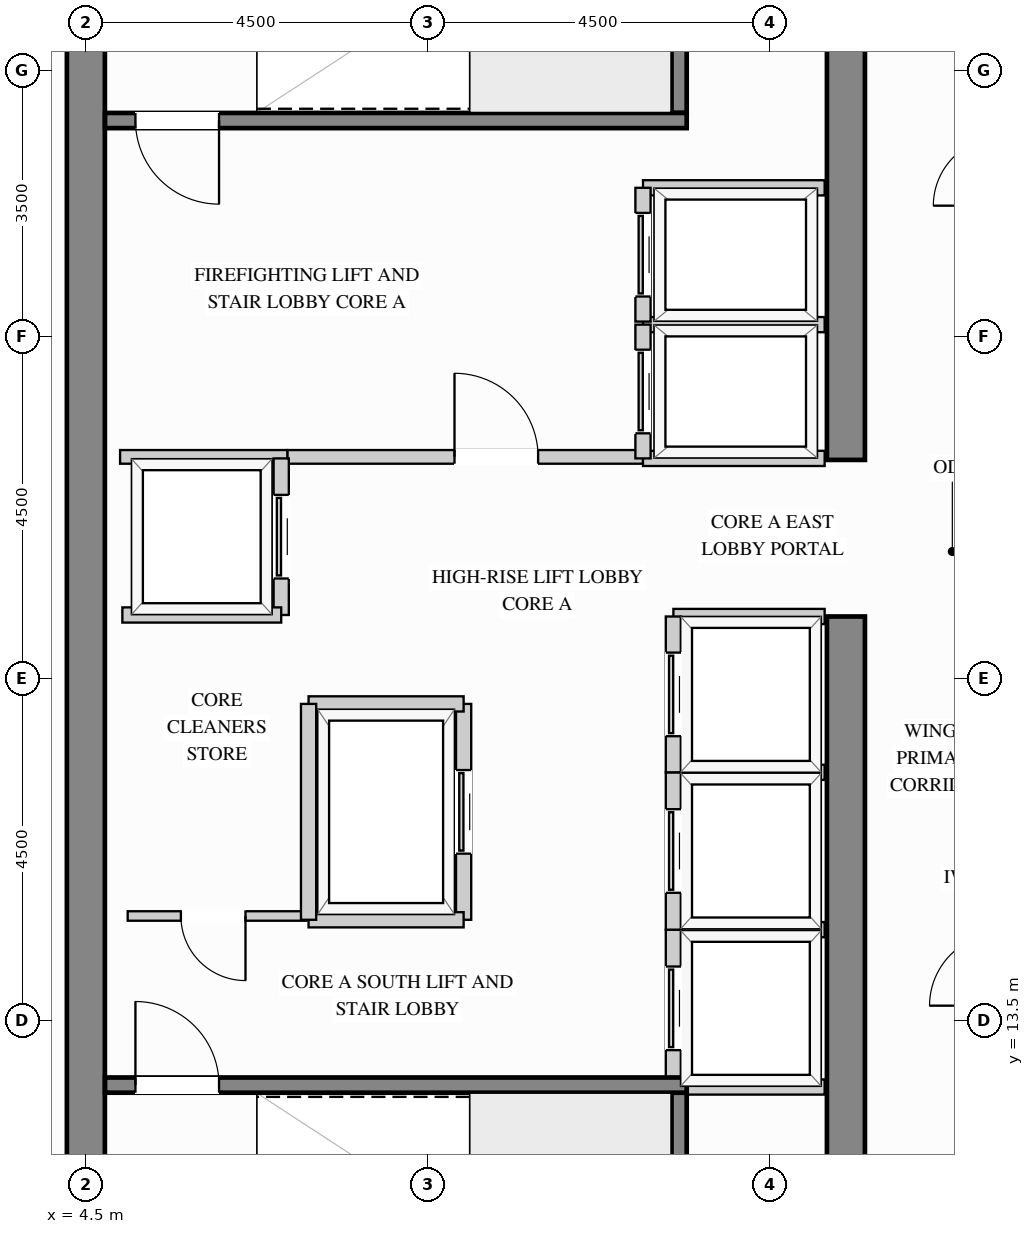
"""IFC4 building model, lengths in metres.
Left out: names, types, materials, properties, quantities, classifications, styles, units other than length and angle.
Written with IfcOpenShell. Run it as: python <this file> out.ifc"""

import sys

from ifc_helpers import new_model, si_unit, direction, frame, frame_2d, origin, place, context, subcontext, project, spatial, rectangle, extrude, source, transform, mapped, element, fill, save


model = new_model("IFC4")
c1 = context("Model", 3, precision=1e-05, world=origin(), true_north=direction((0.0, 1.0)))
c2 = subcontext(c1, "Body", "Model", "MODEL_VIEW")
j1 = project(units=[si_unit("LENGTHUNIT", "METRE"), si_unit("PLANEANGLEUNIT", "RADIAN")], contexts=[c1])
p1 = place(None, origin())
s1 = spatial("IfcSite", under=j1, at=p1, CompositionType="ELEMENT")
p2 = place(p1, origin())
s2 = spatial("IfcBuilding", under=s1, at=p2, CompositionType="ELEMENT")
p3 = place(p2, frame((0.0, 0.0, 212.4)))
s3 = spatial("IfcBuildingStorey", under=s2, at=p3, CompositionType="ELEMENT", Elevation=212.4)
m1 = source(origin(), c2, "Body", "SweptSolid", [
    extrude(rectangle(XDim=10.07, YDim=0.5, at=frame_2d((5.035, 0.0))), origin(), (0.0, 0.0, 1.0), 3.4),
])
p4 = place(p3, frame((14.5, 8.75, 0.0), z_axis=(0.0, 0.0, 1.0), x_axis=(0.0, 1.0, 0.0)))
e1 = element("IfcWall", 1, at=p4, inside=s3, PredefinedType="SHEAR", context=c2, shape_type="MappedRepresentation", body=[
    mapped(m1, transform((0.0, 0.0, 0.0), x_axis=(1.0, 0.0, 0.0), y_axis=(0.0, 1.0, 0.0), z_axis=(0.0, 0.0, 1.0))),
])
m2 = source(origin(), c2, "Body", "SweptSolid", [
    extrude(rectangle(XDim=8.37, YDim=0.5, at=frame_2d((4.185, 0.0))), origin(), (0.0, 0.0, 1.0), 3.4),
])
p5 = place(p3, frame((14.5, 20.88, 0.0), z_axis=(0.0, 0.0, 1.0), x_axis=(0.0, 1.0, 0.0)))
e2 = element("IfcWall", 2, at=p5, inside=s3, PredefinedType="SHEAR", context=c2, shape_type="MappedRepresentation", body=[
    mapped(m2, transform((0.0, 0.0, 0.0), x_axis=(1.0, 0.0, 0.0), y_axis=(0.0, 1.0, 0.0), z_axis=(0.0, 0.0, 1.0))),
])
m3 = source(origin(), c2, "Body", "SweptSolid", [
    extrude(rectangle(XDim=20.5, YDim=0.5, at=frame_2d((10.25, 0.0))), origin(), (0.0, 0.0, 1.0), 3.4),
])
p6 = place(p3, frame((4.5, 8.75, 0.0), z_axis=(0.0, 0.0, 1.0), x_axis=(0.0, 1.0, 0.0)))
e3 = element("IfcWall", 3, at=p6, inside=s3, PredefinedType="SHEAR", context=c2, shape_type="MappedRepresentation", body=[
    mapped(m3, transform((0.0, 0.0, 0.0), x_axis=(1.0, 0.0, 0.0), y_axis=(0.0, 1.0, 0.0), z_axis=(0.0, 0.0, 1.0))),
])
p7 = place(p3, frame((7.15, 20.92, 0.0), z_axis=(0.0, 0.0, 1.0), x_axis=(1.0, 0.0, 0.0)))
e4 = element("IfcWall", 4, at=p7, inside=s3, PredefinedType="PARTITIONING", context=c2, shape_type="SweptSolid", body=[
    extrude(rectangle(XDim=4.68, YDim=0.18, at=frame_2d((2.34, 0.0))), origin(), (0.0, 0.0, 1.0), 3.385),
])
p8 = place(p7, frame((2.2, 0.0, 0.0)))
e5 = element("IfcOpeningElement", 5, at=p8, cuts=e4, PredefinedType="OPENING", context=c2, shape_type="SweptSolid", body=[
    extrude(rectangle(XDim=1.1, YDim=2.15, at=frame_2d((0.55, 1.075))), frame((0.0, 0.1, 0.0), z_axis=(0.0, -1.0, 0.0), x_axis=(1.0, 0.0, 0.0)), (0.0, 0.0, 1.0), 0.2),
])
m4 = source(origin(), c2, "Body", "SweptSolid", [
    extrude(rectangle(XDim=2.2, YDim=0.18, at=frame_2d((1.1, 0.0))), origin(), (0.0, 0.0, 1.0), 3.385),
])
p9 = place(p3, frame((4.95, 20.92, 0.0), z_axis=(0.0, 0.0, 1.0), x_axis=(1.0, 0.0, 0.0)))
e6 = element("IfcWall", 6, at=p9, inside=s3, PredefinedType="PARTITIONING", context=c2, shape_type="MappedRepresentation", body=[
    mapped(m4, transform((0.0, 0.0, 0.0), x_axis=(1.0, 0.0, 0.0), y_axis=(0.0, 1.0, 0.0), z_axis=(0.0, 0.0, 1.0))),
])
p10 = place(p3, frame((5.05, 14.88, 0.0), z_axis=(0.0, 0.0, 1.0), x_axis=(1.0, 0.0, 0.0)))
e7 = element("IfcWall", 7, at=p10, inside=s3, PredefinedType="PARTITIONING", context=c2, shape_type="SweptSolid", body=[
    extrude(rectangle(XDim=2.35, YDim=0.125, at=frame_2d((1.175, 0.0))), origin(), (0.0, 0.0, 1.0), 3.385),
])
p11 = place(p10, frame((0.7, 0.0, 0.0)))
e8 = element("IfcOpeningElement", 8, at=p11, cuts=e7, PredefinedType="OPENING", context=c2, shape_type="SweptSolid", body=[
    extrude(rectangle(XDim=0.85, YDim=2.1, at=frame_2d((0.425, 1.05))), frame((0.0, 0.073, 0.0), z_axis=(0.0, -1.0, 0.0), x_axis=(1.0, 0.0, 0.0)), (0.0, 0.0, 1.0), 0.145),
])
m5 = source(origin(), c2, "Body", "SweptSolid", [
    extrude(rectangle(XDim=2.39, YDim=0.2, at=frame_2d((1.195, 0.0))), origin(), (0.0, 0.0, 1.0), 3.385),
])
for number, where, z_axis, x_axis in (
    (9, (11.83, 22.66, 0.0), (0.0, 0.0, 1.0), (1.0, 0.0, 0.0)),
    (10, (11.83, 20.9, 0.0), (0.0, 0.0, 1.0), (1.0, 0.0, 0.0)),
):
    element("IfcWall", number, at=place(p3, frame(where, z_axis=z_axis, x_axis=x_axis)), inside=s3, PredefinedType="PARTITIONING", context=c2, shape_type="MappedRepresentation", body=[
        mapped(m5, transform((0.0, 0.0, 0.0), x_axis=(1.0, 0.0, 0.0), y_axis=(0.0, 1.0, 0.0), z_axis=(0.0, 0.0, 1.0))),
    ])
p12 = place(p3, frame((11.83, 20.9, 0.0), z_axis=(0.0, 0.0, 1.0), x_axis=(0.0, 1.0, 0.0)))
e11 = element("IfcWall", 11, at=p12, inside=s3, PredefinedType="PARTITIONING", context=c2, shape_type="SweptSolid", body=[
    extrude(rectangle(XDim=1.76, YDim=0.2, at=frame_2d((0.88, 0.0))), origin(), (0.0, 0.0, 1.0), 3.385),
])
p13 = place(p12, frame((0.33, 0.0, 0.0)))
e12 = element("IfcOpeningElement", 12, at=p13, cuts=e11, PredefinedType="OPENING", context=c2, shape_type="SweptSolid", body=[
    extrude(rectangle(XDim=1.1, YDim=2.2, at=frame_2d((0.55, 1.1))), frame((0.0, 0.11, 0.0), z_axis=(0.0, -1.0, 0.0), x_axis=(1.0, 0.0, 0.0)), (0.0, 0.0, 1.0), 0.22),
])
p14 = place(p3, frame((11.83, 24.46, 0.0), z_axis=(0.0, 0.0, 1.0), x_axis=(1.0, 0.0, 0.0)))
e13 = element("IfcWall", 13, at=p14, inside=s3, PredefinedType="PARTITIONING", context=c2, shape_type="MappedRepresentation", body=[
    mapped(m5, transform((0.0, 0.0, 0.0), x_axis=(1.0, 0.0, 0.0), y_axis=(0.0, 1.0, 0.0), z_axis=(0.0, 0.0, 1.0))),
])
p15 = place(p3, frame((11.83, 22.7, 0.0), z_axis=(0.0, 0.0, 1.0), x_axis=(0.0, 1.0, 0.0)))
e14 = element("IfcWall", 14, at=p15, inside=s3, PredefinedType="PARTITIONING", context=c2, shape_type="SweptSolid", body=[
    extrude(rectangle(XDim=1.76, YDim=0.2, at=frame_2d((0.88, 0.0))), origin(), (0.0, 0.0, 1.0), 3.385),
])
p16 = place(p15, frame((0.33, 0.0, 0.0)))
e15 = element("IfcOpeningElement", 15, at=p16, cuts=e14, PredefinedType="OPENING", context=c2, shape_type="SweptSolid", body=[
    extrude(rectangle(XDim=1.1, YDim=2.2, at=frame_2d((0.55, 1.1))), frame((0.0, 0.11, 0.0), z_axis=(0.0, -1.0, 0.0), x_axis=(1.0, 0.0, 0.0)), (0.0, 0.0, 1.0), 0.22),
])
m6 = source(origin(), c2, "Body", "SweptSolid", [
    extrude(rectangle(XDim=1.99, YDim=0.2, at=frame_2d((0.995, 0.0))), origin(), (0.0, 0.0, 1.0), 3.385),
])
for number, where, z_axis, x_axis in (
    (16, (12.23, 14.7, 0.0), (0.0, 0.0, 1.0), (1.0, 0.0, 0.0)),
    (17, (12.23, 12.63, 0.0), (0.0, 0.0, 1.0), (1.0, 0.0, 0.0)),
):
    element("IfcWall", number, at=place(p3, frame(where, z_axis=z_axis, x_axis=x_axis)), inside=s3, PredefinedType="PARTITIONING", context=c2, shape_type="MappedRepresentation", body=[
        mapped(m6, transform((0.0, 0.0, 0.0), x_axis=(1.0, 0.0, 0.0), y_axis=(0.0, 1.0, 0.0), z_axis=(0.0, 0.0, 1.0))),
    ])
p17 = place(p3, frame((12.23, 12.63, 0.0), z_axis=(0.0, 0.0, 1.0), x_axis=(0.0, 1.0, 0.0)))
e18 = element("IfcWall", 18, at=p17, inside=s3, PredefinedType="PARTITIONING", context=c2, shape_type="SweptSolid", body=[
    extrude(rectangle(XDim=2.07, YDim=0.2, at=frame_2d((1.035, 0.0))), origin(), (0.0, 0.0, 1.0), 3.385),
])
p18 = place(p17, frame((0.485, 0.0, 0.0)))
e19 = element("IfcOpeningElement", 19, at=p18, cuts=e18, PredefinedType="OPENING", context=c2, shape_type="SweptSolid", body=[
    extrude(rectangle(XDim=1.1, YDim=2.2, at=frame_2d((0.55, 1.1))), frame((0.0, 0.11, 0.0), z_axis=(0.0, -1.0, 0.0), x_axis=(1.0, 0.0, 0.0)), (0.0, 0.0, 1.0), 0.22),
])
p19 = place(p3, frame((12.23, 16.77, 0.0), z_axis=(0.0, 0.0, 1.0), x_axis=(1.0, 0.0, 0.0)))
e20 = element("IfcWall", 20, at=p19, inside=s3, PredefinedType="PARTITIONING", context=c2, shape_type="MappedRepresentation", body=[
    mapped(m6, transform((0.0, 0.0, 0.0), x_axis=(1.0, 0.0, 0.0), y_axis=(0.0, 1.0, 0.0), z_axis=(0.0, 0.0, 1.0))),
])
p20 = place(p3, frame((12.23, 14.7, 0.0), z_axis=(0.0, 0.0, 1.0), x_axis=(0.0, 1.0, 0.0)))
e21 = element("IfcWall", 21, at=p20, inside=s3, PredefinedType="PARTITIONING", context=c2, shape_type="SweptSolid", body=[
    extrude(rectangle(XDim=2.07, YDim=0.2, at=frame_2d((1.035, 0.0))), origin(), (0.0, 0.0, 1.0), 3.385),
])
p21 = place(p20, frame((0.485, 0.0, 0.0)))
e22 = element("IfcOpeningElement", 22, at=p21, cuts=e21, PredefinedType="OPENING", context=c2, shape_type="SweptSolid", body=[
    extrude(rectangle(XDim=1.1, YDim=2.2, at=frame_2d((0.55, 1.1))), frame((0.0, 0.11, 0.0), z_axis=(0.0, -1.0, 0.0), x_axis=(1.0, 0.0, 0.0)), (0.0, 0.0, 1.0), 0.22),
])
p22 = place(p3, frame((12.23, 18.82, 0.0), z_axis=(0.0, 0.0, 1.0), x_axis=(1.0, 0.0, 0.0)))
e23 = element("IfcWall", 23, at=p22, inside=s3, PredefinedType="PARTITIONING", context=c2, shape_type="MappedRepresentation", body=[
    mapped(m6, transform((0.0, 0.0, 0.0), x_axis=(1.0, 0.0, 0.0), y_axis=(0.0, 1.0, 0.0), z_axis=(0.0, 0.0, 1.0))),
])
p23 = place(p3, frame((12.23, 16.77, 0.0), z_axis=(0.0, 0.0, 1.0), x_axis=(0.0, 1.0, 0.0)))
e24 = element("IfcWall", 24, at=p23, inside=s3, PredefinedType="PARTITIONING", context=c2, shape_type="SweptSolid", body=[
    extrude(rectangle(XDim=2.05, YDim=0.2, at=frame_2d((1.025, 0.0))), origin(), (0.0, 0.0, 1.0), 3.385),
])
p24 = place(p23, frame((0.475, 0.0, 0.0)))
e25 = element("IfcOpeningElement", 25, at=p24, cuts=e24, PredefinedType="OPENING", context=c2, shape_type="SweptSolid", body=[
    extrude(rectangle(XDim=1.1, YDim=2.2, at=frame_2d((0.55, 1.1))), frame((0.0, 0.11, 0.0), z_axis=(0.0, -1.0, 0.0), x_axis=(1.0, 0.0, 0.0)), (0.0, 0.0, 1.0), 0.22),
])
p25 = place(p3, frame((7.07, 18.84, 0.0), z_axis=(0.0, 0.0, 1.0), x_axis=(0.0, 1.0, 0.0)))
e26 = element("IfcWall", 26, at=p25, inside=s3, PredefinedType="PARTITIONING", context=c2, shape_type="SweptSolid", body=[
    extrude(rectangle(XDim=2.06, YDim=0.2, at=frame_2d((1.03, 0.0))), origin(), (0.0, 0.0, 1.0), 3.385),
])
p26 = place(p25, frame((0.48, 0.0, 0.0)))
e27 = element("IfcOpeningElement", 27, at=p26, cuts=e26, PredefinedType="OPENING", context=c2, shape_type="SweptSolid", body=[
    extrude(rectangle(XDim=1.1, YDim=2.2, at=frame_2d((0.55, 1.1))), frame((0.0, 0.11, 0.0), z_axis=(0.0, -1.0, 0.0), x_axis=(1.0, 0.0, 0.0)), (0.0, 0.0, 1.0), 0.22),
])
m7 = source(origin(), c2, "Body", "SweptSolid", [
    extrude(rectangle(XDim=2.09, YDim=0.2, at=frame_2d((1.045, 0.0))), origin(), (0.0, 0.0, 1.0), 3.385),
])
p27 = place(p3, frame((4.98, 18.84, 0.0), z_axis=(0.0, 0.0, 1.0), x_axis=(1.0, 0.0, 0.0)))
e28 = element("IfcWall", 28, at=p27, inside=s3, PredefinedType="PARTITIONING", context=c2, shape_type="MappedRepresentation", body=[
    mapped(m7, transform((0.0, 0.0, 0.0), x_axis=(1.0, 0.0, 0.0), y_axis=(0.0, 1.0, 0.0), z_axis=(0.0, 0.0, 1.0))),
])
p28 = place(p3, frame((9.47, 14.83, 0.0), z_axis=(0.0, 0.0, 1.0), x_axis=(0.0, 1.0, 0.0)))
e29 = element("IfcWall", 29, at=p28, inside=s3, PredefinedType="PARTITIONING", context=c2, shape_type="SweptSolid", body=[
    extrude(rectangle(XDim=2.84, YDim=0.2, at=frame_2d((1.42, 0.0))), origin(), (0.0, 0.0, 1.0), 3.385),
])
p29 = place(p28, frame((0.87, 0.0, 0.0)))
e30 = element("IfcOpeningElement", 30, at=p29, cuts=e29, PredefinedType="OPENING", context=c2, shape_type="SweptSolid", body=[
    extrude(rectangle(XDim=1.1, YDim=2.2, at=frame_2d((0.55, 1.1))), frame((0.0, 0.11, 0.0), z_axis=(0.0, -1.0, 0.0), x_axis=(1.0, 0.0, 0.0)), (0.0, 0.0, 1.0), 0.22),
])
m8 = source(origin(), c2, "Body", "SweptSolid", [
    extrude(rectangle(XDim=2.04, YDim=0.2, at=frame_2d((1.02, 0.0))), origin(), (0.0, 0.0, 1.0), 3.385),
])
for number, where, z_axis, x_axis in (
    (31, (7.43, 17.67, 0.0), (0.0, 0.0, 1.0), (1.0, 0.0, 0.0)),
    (32, (7.43, 14.83, 0.0), (0.0, 0.0, 1.0), (1.0, 0.0, 0.0)),
):
    element("IfcWall", number, at=place(p3, frame(where, z_axis=z_axis, x_axis=x_axis)), inside=s3, PredefinedType="PARTITIONING", context=c2, shape_type="MappedRepresentation", body=[
        mapped(m8, transform((0.0, 0.0, 0.0), x_axis=(1.0, 0.0, 0.0), y_axis=(0.0, 1.0, 0.0), z_axis=(0.0, 0.0, 1.0))),
    ])
m9 = source(origin(), c2, "Body", "SweptSolid", [
    extrude(rectangle(XDim=2.84, YDim=0.2, at=frame_2d((1.42, 0.0))), origin(), (0.0, 0.0, 1.0), 3.385),
])
p30 = place(p3, frame((7.43, 14.83, 0.0), z_axis=(0.0, 0.0, 1.0), x_axis=(0.0, 1.0, 0.0)))
e33 = element("IfcWall", 33, at=p30, inside=s3, PredefinedType="PARTITIONING", context=c2, shape_type="MappedRepresentation", body=[
    mapped(m9, transform((0.0, 0.0, 0.0), x_axis=(1.0, 0.0, 0.0), y_axis=(0.0, 1.0, 0.0), z_axis=(0.0, 0.0, 1.0))),
])
m10 = source(origin(), c2, "Body", "SweptSolid", [
    extrude(rectangle(XDim=3.803, YDim=0.2, at=frame_2d((1.901, 0.0))), origin(), (0.0, 0.0, 1.0), 3.4),
])
p31 = place(p3, frame((12.305, 8.752, 0.0), z_axis=(0.0, 0.0, 1.0), x_axis=(0.0, 1.0, 0.0)))
e34 = element("IfcWall", 34, at=p31, inside=s3, PredefinedType="SHEAR", context=c2, shape_type="MappedRepresentation", body=[
    mapped(m10, transform((0.0, 0.0, 0.0), x_axis=(1.0, 0.0, 0.0), y_axis=(0.0, 1.0, 0.0), z_axis=(0.0, 0.0, 1.0))),
])
p32 = place(p3, frame((4.752, 12.655, 0.0), z_axis=(0.0, 0.0, 1.0), x_axis=(1.0, 0.0, 0.0)))
e35 = element("IfcWall", 35, at=p32, inside=s3, PredefinedType="SHEAR", context=c2, shape_type="SweptSolid", body=[
    extrude(rectangle(XDim=7.653, YDim=0.2, at=frame_2d((3.827, 0.0))), origin(), (0.0, 0.0, 1.0), 3.4),
])
p33 = place(p32, frame((0.4, 0.0, 0.0)))
e36 = element("IfcOpeningElement", 36, at=p33, cuts=e35, PredefinedType="OPENING", context=c2, shape_type="SweptSolid", body=[
    extrude(rectangle(XDim=1.1, YDim=2.15, at=frame_2d((0.55, 1.075))), frame((0.0, 0.11, 0.0), z_axis=(0.0, -1.0, 0.0), x_axis=(1.0, 0.0, 0.0)), (0.0, 0.0, 1.0), 0.22),
])
p34 = place(p3, frame((12.305, 25.445, 0.0), z_axis=(0.0, 0.0, 1.0), x_axis=(0.0, 1.0, 0.0)))
e37 = element("IfcWall", 37, at=p34, inside=s3, PredefinedType="SHEAR", context=c2, shape_type="MappedRepresentation", body=[
    mapped(m10, transform((0.0, 0.0, 0.0), x_axis=(1.0, 0.0, 0.0), y_axis=(0.0, 1.0, 0.0), z_axis=(0.0, 0.0, 1.0))),
])
p35 = place(p3, frame((4.752, 25.345, 0.0), z_axis=(0.0, 0.0, 1.0), x_axis=(1.0, 0.0, 0.0)))
e38 = element("IfcWall", 38, at=p35, inside=s3, PredefinedType="SHEAR", context=c2, shape_type="SweptSolid", body=[
    extrude(rectangle(XDim=7.653, YDim=0.2, at=frame_2d((3.827, 0.0))), origin(), (0.0, 0.0, 1.0), 3.4),
])
p36 = place(p35, frame((0.4, 0.0, 0.0)))
e39 = element("IfcOpeningElement", 39, at=p36, cuts=e38, PredefinedType="OPENING", context=c2, shape_type="SweptSolid", body=[
    extrude(rectangle(XDim=1.1, YDim=2.15, at=frame_2d((0.55, 1.075))), frame((0.0, 0.11, 0.0), z_axis=(0.0, -1.0, 0.0), x_axis=(1.0, 0.0, 0.0)), (0.0, 0.0, 1.0), 0.22),
])
m11 = source(origin(), c2, "Body", "SweptSolid", [
    extrude(rectangle(XDim=1.1, YDim=2.15, at=frame_2d((0.55, 1.075))), frame((0.0, 0.025, 0.0), z_axis=(0.0, -1.0, 0.0), x_axis=(1.0, 0.0, 0.0)), (0.0, 0.0, 1.0), 0.05),
])
p37 = place(p8, origin())
e40 = element("IfcDoor", 40, at=p37, inside=s3, OperationType="SINGLE_SWING_LEFT", PredefinedType="DOOR", context=c2, shape_type="MappedRepresentation", body=[
    mapped(m11, transform((0.0, 0.0, 0.0), x_axis=(1.0, 0.0, 0.0), y_axis=(0.0, 1.0, 0.0), z_axis=(0.0, 0.0, 1.0))),
])
fill(e5, e40)
m12 = source(origin(), c2, "Body", "SweptSolid", [
    extrude(rectangle(XDim=1.1, YDim=2.2, at=frame_2d((0.55, 1.1))), frame((0.0, 0.025, 0.0), z_axis=(0.0, -1.0, 0.0), x_axis=(1.0, 0.0, 0.0)), (0.0, 0.0, 1.0), 0.05),
])
p38 = place(p13, origin())
e41 = element("IfcDoor", 41, at=p38, inside=s3, OperationType="SLIDING_TO_LEFT", PredefinedType="DOOR", context=c2, shape_type="MappedRepresentation", body=[
    mapped(m12, transform((0.0, 0.0, 0.0), x_axis=(1.0, 0.0, 0.0), y_axis=(0.0, 1.0, 0.0), z_axis=(0.0, 0.0, 1.0))),
])
fill(e12, e41)
p39 = place(p16, origin())
e42 = element("IfcDoor", 42, at=p39, inside=s3, OperationType="SLIDING_TO_LEFT", PredefinedType="DOOR", context=c2, shape_type="MappedRepresentation", body=[
    mapped(m12, transform((0.0, 0.0, 0.0), x_axis=(1.0, 0.0, 0.0), y_axis=(0.0, 1.0, 0.0), z_axis=(0.0, 0.0, 1.0))),
])
fill(e15, e42)
p40 = place(p18, origin())
e43 = element("IfcDoor", 43, at=p40, inside=s3, OperationType="SLIDING_TO_LEFT", PredefinedType="DOOR", context=c2, shape_type="MappedRepresentation", body=[
    mapped(m12, transform((0.0, 0.0, 0.0), x_axis=(1.0, 0.0, 0.0), y_axis=(0.0, 1.0, 0.0), z_axis=(0.0, 0.0, 1.0))),
])
fill(e19, e43)
p41 = place(p21, origin())
e44 = element("IfcDoor", 44, at=p41, inside=s3, OperationType="SLIDING_TO_LEFT", PredefinedType="DOOR", context=c2, shape_type="MappedRepresentation", body=[
    mapped(m12, transform((0.0, 0.0, 0.0), x_axis=(1.0, 0.0, 0.0), y_axis=(0.0, 1.0, 0.0), z_axis=(0.0, 0.0, 1.0))),
])
fill(e22, e44)
p42 = place(p24, origin())
e45 = element("IfcDoor", 45, at=p42, inside=s3, OperationType="SLIDING_TO_LEFT", PredefinedType="DOOR", context=c2, shape_type="MappedRepresentation", body=[
    mapped(m12, transform((0.0, 0.0, 0.0), x_axis=(1.0, 0.0, 0.0), y_axis=(0.0, 1.0, 0.0), z_axis=(0.0, 0.0, 1.0))),
])
fill(e25, e45)
p43 = place(p26, origin())
e46 = element("IfcDoor", 46, at=p43, inside=s3, OperationType="SLIDING_TO_LEFT", PredefinedType="DOOR", context=c2, shape_type="MappedRepresentation", body=[
    mapped(m12, transform((0.0, 0.0, 0.0), x_axis=(1.0, 0.0, 0.0), y_axis=(0.0, 1.0, 0.0), z_axis=(0.0, 0.0, 1.0))),
])
fill(e27, e46)
p44 = place(p29, origin())
e47 = element("IfcDoor", 47, at=p44, inside=s3, OperationType="SLIDING_TO_LEFT", PredefinedType="DOOR", context=c2, shape_type="MappedRepresentation", body=[
    mapped(m12, transform((0.0, 0.0, 0.0), x_axis=(1.0, 0.0, 0.0), y_axis=(0.0, 1.0, 0.0), z_axis=(0.0, 0.0, 1.0))),
])
fill(e30, e47)
m13 = source(origin(), c2, "Body", "SweptSolid", [
    extrude(rectangle(XDim=0.85, YDim=2.1, at=frame_2d((0.425, 1.05))), frame((0.0, 0.025, 0.0), z_axis=(0.0, -1.0, 0.0), x_axis=(1.0, 0.0, 0.0)), (0.0, 0.0, 1.0), 0.05),
])
p45 = place(p11, origin())
e48 = element("IfcDoor", 48, at=p45, inside=s3, OperationType="SINGLE_SWING_RIGHT", PredefinedType="DOOR", context=c2, shape_type="MappedRepresentation", body=[
    mapped(m13, transform((0.0, 0.0, 0.0), x_axis=(1.0, 0.0, 0.0), y_axis=(0.0, 1.0, 0.0), z_axis=(0.0, 0.0, 1.0))),
])
fill(e8, e48)
m14 = source(origin(), c2, "Body", "SweptSolid", [
    extrude(rectangle(XDim=1.1, YDim=2.15, at=frame_2d((0.55, 1.075))), frame((0.0, 0.025, 0.0), z_axis=(0.0, -1.0, 0.0), x_axis=(1.0, 0.0, 0.0)), (0.0, 0.0, 1.0), 0.05),
])
p46 = place(p33, origin())
e49 = element("IfcDoor", 49, at=p46, inside=s3, OperationType="SINGLE_SWING_LEFT", PredefinedType="DOOR", context=c2, shape_type="MappedRepresentation", body=[
    mapped(m14, transform((0.0, 0.0, 0.0), x_axis=(1.0, 0.0, 0.0), y_axis=(0.0, 1.0, 0.0), z_axis=(0.0, 0.0, 1.0))),
])
fill(e36, e49)
p47 = place(p36, origin())
e50 = element("IfcDoor", 50, at=p47, inside=s3, OperationType="SINGLE_SWING_RIGHT", PredefinedType="DOOR", context=c2, shape_type="MappedRepresentation", body=[
    mapped(m14, transform((0.0, 0.0, 0.0), x_axis=(1.0, 0.0, 0.0), y_axis=(0.0, 1.0, 0.0), z_axis=(0.0, 0.0, 1.0))),
])
fill(e39, e50)
save(model, sys.argv[1])
